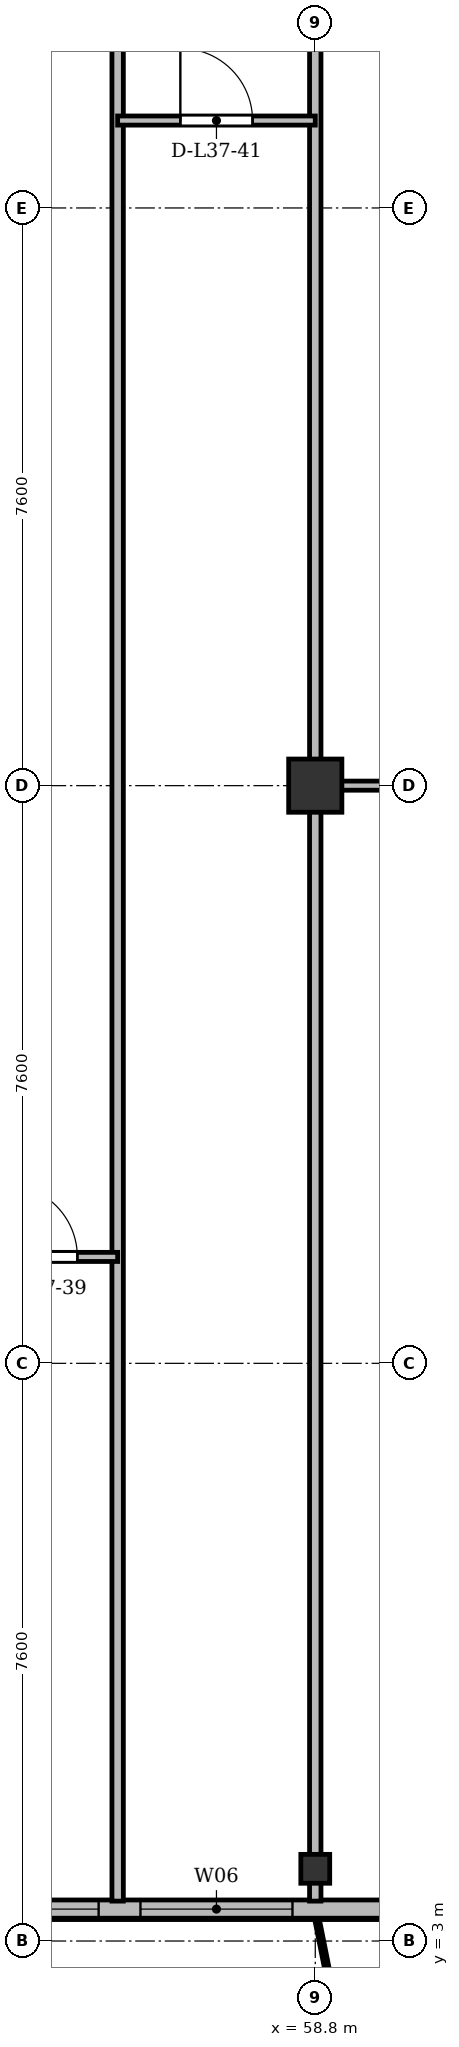
"""IFC4 building model, lengths in metres.
Left out: names, types, materials, properties, quantities, classifications, styles, units other than length and angle.
Written with IfcOpenShell. Run it as: python <this file> out.ifc"""

import sys

from ifc_helpers import new_model, si_unit, direction, frame, frame_2d, origin, origin_2d, place, context, subcontext, project, spatial, rectangle, i_section, extrude, source, transform, mapped, element, fill, save


model = new_model("IFC4")
c1 = context("Model", 3, precision=1e-05, world=origin(), true_north=direction((0.0, 1.0)))
c2 = subcontext(c1, "Body", "Model", "MODEL_VIEW")
j1 = project(units=[si_unit("LENGTHUNIT", "METRE"), si_unit("PLANEANGLEUNIT", "RADIAN")], contexts=[c1])
p1 = place(None, origin())
s1 = spatial("IfcSite", under=j1, at=p1, CompositionType="ELEMENT")
p2 = place(p1, origin())
s2 = spatial("IfcBuilding", under=s1, at=p2, CompositionType="ELEMENT")
p3 = place(p2, frame((0.0, 0.0, 142.9)))
s3 = spatial("IfcBuildingStorey", under=s2, at=p3, CompositionType="ELEMENT", Elevation=142.9)
m1 = source(origin(), c2, "Body", "SweptSolid", [
    extrude(i_section(OverallWidth=0.38, OverallDepth=0.38, WebThickness=0.02, FlangeThickness=0.03, at=origin_2d()), origin(), (0.0, 0.0, 1.0), 3.6),
])
p4 = place(p3, frame((58.8, 3.95, 0.0), z_axis=(0.0, 0.0, 1.0), x_axis=(1.0, 0.0, 0.0)))
e1 = element("IfcColumn", 1, at=p4, inside=s3, PredefinedType="COLUMN", context=c2, shape_type="MappedRepresentation", body=[
    mapped(m1, transform((0.0, 0.0, 0.0), x_axis=(1.0, 0.0, 0.0), y_axis=(0.0, 1.0, 0.0), z_axis=(0.0, 0.0, 1.0), scale=1.0)),
])
m2 = source(origin(), c2, "Body", "SweptSolid", [
    extrude(rectangle(XDim=0.7, YDim=0.7, at=origin_2d()), origin(), (0.0, 0.0, 1.0), 3.6),
])
p5 = place(p3, frame((58.8, 18.2, 0.0), z_axis=(0.0, 0.0, 1.0), x_axis=(1.0, 0.0, 0.0)))
e2 = element("IfcColumn", 2, at=p5, inside=s3, PredefinedType="COLUMN", context=c2, shape_type="MappedRepresentation", body=[
    mapped(m2, transform((0.0, 0.0, 0.0), x_axis=(1.0, 0.0, 0.0), y_axis=(0.0, 1.0, 0.0), z_axis=(0.0, 0.0, 1.0), scale=1.0)),
])
p6 = place(p3, frame((63.6, 3.42, 0.0), z_axis=(0.0, 0.0, 1.0), x_axis=(-1.0, 0.0, 0.0)))
e3 = element("IfcWall", 3, at=p6, inside=s3, PredefinedType="SOLIDWALL", context=c2, shape_type="SweptSolid", body=[
    extrude(rectangle(XDim=52.8, YDim=0.24, at=frame_2d((26.4, 0.0))), origin(), (0.0, 0.0, 1.0), 3.35),
])
p7 = place(p6, frame((1.695, 0.0, 0.9)))
e4 = element("IfcOpeningElement", 4, at=p7, cuts=e3, PredefinedType="OPENING", context=c2, shape_type="SweptSolid", body=[
    extrude(rectangle(XDim=1.5, YDim=1.75, at=frame_2d((0.75, 0.875))), frame((0.0, 0.13, 0.0), z_axis=(0.0, -1.0, 0.0), x_axis=(1.0, 0.0, 0.0)), (0.0, 0.0, 1.0), 0.26),
])
p8 = place(p6, frame((5.1, 0.0, 0.9)))
e5 = element("IfcOpeningElement", 5, at=p8, cuts=e3, PredefinedType="OPENING", context=c2, shape_type="SweptSolid", body=[
    extrude(rectangle(XDim=2.0, YDim=1.95, at=frame_2d((1.0, 0.975))), frame((0.0, 0.13, 0.0), z_axis=(0.0, -1.0, 0.0), x_axis=(1.0, 0.0, 0.0)), (0.0, 0.0, 1.0), 0.26),
])
p9 = place(p6, frame((7.65, 0.0, 0.9)))
e6 = element("IfcOpeningElement", 6, at=p9, cuts=e3, PredefinedType="OPENING", context=c2, shape_type="SweptSolid", body=[
    extrude(rectangle(XDim=1.5, YDim=1.75, at=frame_2d((0.75, 0.875))), frame((0.0, 0.13, 0.0), z_axis=(0.0, -1.0, 0.0), x_axis=(1.0, 0.0, 0.0)), (0.0, 0.0, 1.0), 0.26),
])
p10 = place(p6, frame((10.1, 0.0, 0.9)))
e7 = element("IfcOpeningElement", 7, at=p10, cuts=e3, PredefinedType="OPENING", context=c2, shape_type="SweptSolid", body=[
    extrude(rectangle(XDim=1.8, YDim=1.8, at=frame_2d((0.9, 0.9))), frame((0.0, 0.13, 0.0), z_axis=(0.0, -1.0, 0.0), x_axis=(1.0, 0.0, 0.0)), (0.0, 0.0, 1.0), 0.26),
])
p11 = place(p6, frame((14.417, 0.0, 0.0)))
e8 = element("IfcOpeningElement", 8, at=p11, cuts=e3, PredefinedType="OPENING", context=c2, shape_type="SweptSolid", body=[
    extrude(rectangle(XDim=1.2, YDim=2.2, at=frame_2d((0.6, 1.1))), frame((0.0, 0.13, 0.0), z_axis=(0.0, -1.0, 0.0), x_axis=(1.0, 0.0, 0.0)), (0.0, 0.0, 1.0), 0.26),
])
p12 = place(p6, frame((25.65, 0.0, 0.9)))
e9 = element("IfcOpeningElement", 9, at=p12, cuts=e3, PredefinedType="OPENING", context=c2, shape_type="SweptSolid", body=[
    extrude(rectangle(XDim=1.5, YDim=1.75, at=frame_2d((0.75, 0.875))), frame((0.0, 0.13, 0.0), z_axis=(0.0, -1.0, 0.0), x_axis=(1.0, 0.0, 0.0)), (0.0, 0.0, 1.0), 0.26),
])
p13 = place(p6, frame((35.6, 0.0, 0.9)))
e10 = element("IfcOpeningElement", 10, at=p13, cuts=e3, PredefinedType="OPENING", context=c2, shape_type="SweptSolid", body=[
    extrude(rectangle(XDim=2.0, YDim=1.95, at=frame_2d((1.0, 0.975))), frame((0.0, 0.13, 0.0), z_axis=(0.0, -1.0, 0.0), x_axis=(1.0, 0.0, 0.0)), (0.0, 0.0, 1.0), 0.26),
])
p14 = place(p6, frame((41.656, 0.0, 0.0)))
e11 = element("IfcOpeningElement", 11, at=p14, cuts=e3, PredefinedType="OPENING", context=c2, shape_type="SweptSolid", body=[
    extrude(rectangle(XDim=1.2, YDim=2.2, at=frame_2d((0.6, 1.1))), frame((0.0, 0.13, 0.0), z_axis=(0.0, -1.0, 0.0), x_axis=(1.0, 0.0, 0.0)), (0.0, 0.0, 1.0), 0.26),
])
p15 = place(p6, frame((43.65, 0.0, 0.9)))
e12 = element("IfcOpeningElement", 12, at=p15, cuts=e3, PredefinedType="OPENING", context=c2, shape_type="SweptSolid", body=[
    extrude(rectangle(XDim=1.5, YDim=1.75, at=frame_2d((0.75, 0.875))), frame((0.0, 0.13, 0.0), z_axis=(0.0, -1.0, 0.0), x_axis=(1.0, 0.0, 0.0)), (0.0, 0.0, 1.0), 0.26),
])
p16 = place(p6, frame((45.95, 0.0, 0.9)))
e13 = element("IfcOpeningElement", 13, at=p16, cuts=e3, PredefinedType="OPENING", context=c2, shape_type="SweptSolid", body=[
    extrude(rectangle(XDim=1.5, YDim=1.75, at=frame_2d((0.75, 0.875))), frame((0.0, 0.13, 0.0), z_axis=(0.0, -1.0, 0.0), x_axis=(1.0, 0.0, 0.0)), (0.0, 0.0, 1.0), 0.26),
])
p17 = place(p6, frame((49.605, 0.0, 0.9)))
e14 = element("IfcOpeningElement", 14, at=p17, cuts=e3, PredefinedType="OPENING", context=c2, shape_type="SweptSolid", body=[
    extrude(rectangle(XDim=1.5, YDim=1.75, at=frame_2d((0.75, 0.875))), frame((0.0, 0.13, 0.0), z_axis=(0.0, -1.0, 0.0), x_axis=(1.0, 0.0, 0.0)), (0.0, 0.0, 1.0), 0.26),
])
p18 = place(p3, frame((58.8, 3.525, 0.0), z_axis=(0.0, 0.0, 1.0), x_axis=(0.0, 1.0, 0.0)))
e15 = element("IfcWall", 15, at=p18, inside=s3, PredefinedType="PARTITIONING", context=c2, shape_type="SweptSolid", body=[
    extrude(rectangle(XDim=27.275, YDim=0.15, at=frame_2d((13.638, 0.0))), origin(), (0.0, 0.0, 1.0), 2.85),
])
p19 = place(p3, frame((56.2, 3.525, 0.0), z_axis=(0.0, 0.0, 1.0), x_axis=(0.0, 1.0, 0.0)))
e16 = element("IfcWall", 16, at=p19, inside=s3, PredefinedType="PARTITIONING", context=c2, shape_type="SweptSolid", body=[
    extrude(rectangle(XDim=27.275, YDim=0.15, at=frame_2d((13.638, 0.0))), origin(), (0.0, 0.0, 1.0), 2.75),
])
p20 = place(p3, frame((54.2, 12.0, 0.0), z_axis=(0.0, 0.0, 1.0), x_axis=(1.0, 0.0, 0.0)))
e17 = element("IfcWall", 17, at=p20, inside=s3, PredefinedType="PARTITIONING", context=c2, shape_type="SweptSolid", body=[
    extrude(rectangle(XDim=2.0, YDim=0.12, at=frame_2d((1.0, 0.0))), origin(), (0.0, 0.0, 1.0), 3.35),
])
p21 = place(p20, frame((0.52, 0.0, 0.0)))
e18 = element("IfcOpeningElement", 18, at=p21, cuts=e17, PredefinedType="OPENING", context=c2, shape_type="SweptSolid", body=[
    extrude(rectangle(XDim=0.95, YDim=2.15, at=frame_2d((0.475, 1.075))), frame((0.0, 0.07, 0.0), z_axis=(0.0, -1.0, 0.0), x_axis=(1.0, 0.0, 0.0)), (0.0, 0.0, 1.0), 0.14),
])
p22 = place(p3, frame((56.2, 26.95, 0.0), z_axis=(0.0, 0.0, 1.0), x_axis=(1.0, 0.0, 0.0)))
e19 = element("IfcWall", 19, at=p22, inside=s3, PredefinedType="PARTITIONING", context=c2, shape_type="SweptSolid", body=[
    extrude(rectangle(XDim=2.6, YDim=0.12, at=frame_2d((1.3, 0.0))), origin(), (0.0, 0.0, 1.0), 2.85),
])
p23 = place(p22, frame((0.825, 0.0, 0.0)))
e20 = element("IfcOpeningElement", 20, at=p23, cuts=e19, PredefinedType="OPENING", context=c2, shape_type="SweptSolid", body=[
    extrude(rectangle(XDim=0.95, YDim=2.15, at=frame_2d((0.475, 1.075))), frame((0.0, 0.07, 0.0), z_axis=(0.0, -1.0, 0.0), x_axis=(1.0, 0.0, 0.0)), (0.0, 0.0, 1.0), 0.14),
])
p24 = place(p3, frame((58.8, 18.2, 0.0), z_axis=(0.0, 0.0, 1.0), x_axis=(1.0, 0.0, 0.0)))
e21 = element("IfcWall", 21, at=p24, inside=s3, PredefinedType="PARTITIONING", context=c2, shape_type="SweptSolid", body=[
    extrude(rectangle(XDim=7.575, YDim=0.12, at=frame_2d((3.788, 0.0))), origin(), (0.0, 0.0, 1.0), 2.75),
])
p25 = place(p24, frame((3.313, 0.0, 0.0)))
e22 = element("IfcOpeningElement", 22, at=p25, cuts=e21, PredefinedType="OPENING", context=c2, shape_type="SweptSolid", body=[
    extrude(rectangle(XDim=0.95, YDim=2.15, at=frame_2d((0.475, 1.075))), frame((0.0, 0.07, 0.0), z_axis=(0.0, -1.0, 0.0), x_axis=(1.0, 0.0, 0.0)), (0.0, 0.0, 1.0), 0.14),
])
m3 = source(origin(), c2, "Body", "SweptSolid", [
    extrude(rectangle(XDim=2.0, YDim=1.95, at=frame_2d((1.0, 0.975))), frame((0.0, 0.03, 0.0), z_axis=(0.0, -1.0, 0.0), x_axis=(1.0, 0.0, 0.0)), (0.0, 0.0, 1.0), 0.06),
])
p26 = place(p8, origin())
e23 = element("IfcWindow", 23, at=p26, inside=s3, PartitioningType="SINGLE_PANEL", PredefinedType="WINDOW", context=c2, shape_type="MappedRepresentation", body=[
    mapped(m3, transform((0.0, 0.0, 0.0), x_axis=(1.0, 0.0, 0.0), y_axis=(0.0, 1.0, 0.0), z_axis=(0.0, 0.0, 1.0), scale=1.0)),
])
fill(e5, e23)
m4 = source(origin(), c2, "Body", "SweptSolid", [
    extrude(rectangle(XDim=1.5, YDim=1.75, at=frame_2d((0.75, 0.875))), frame((0.0, 0.03, 0.0), z_axis=(0.0, -1.0, 0.0), x_axis=(1.0, 0.0, 0.0)), (0.0, 0.0, 1.0), 0.06),
])
p27 = place(p9, origin())
e24 = element("IfcWindow", 24, at=p27, inside=s3, PartitioningType="SINGLE_PANEL", PredefinedType="WINDOW", context=c2, shape_type="MappedRepresentation", body=[
    mapped(m4, transform((0.0, 0.0, 0.0), x_axis=(1.0, 0.0, 0.0), y_axis=(0.0, 1.0, 0.0), z_axis=(0.0, 0.0, 1.0), scale=1.0)),
])
fill(e6, e24)
m5 = source(origin(), c2, "Body", "SweptSolid", [
    extrude(rectangle(XDim=0.95, YDim=2.15, at=frame_2d((0.475, 1.075))), frame((0.0, 0.025, 0.0), z_axis=(0.0, -1.0, 0.0), x_axis=(1.0, 0.0, 0.0)), (0.0, 0.0, 1.0), 0.05),
])
p28 = place(p21, origin())
e25 = element("IfcDoor", 25, at=p28, inside=s3, OperationType="SINGLE_SWING_LEFT", PredefinedType="DOOR", context=c2, shape_type="MappedRepresentation", body=[
    mapped(m5, transform((0.0, 0.0, 0.0), x_axis=(1.0, 0.0, 0.0), y_axis=(0.0, 1.0, 0.0), z_axis=(0.0, 0.0, 1.0), scale=1.0)),
])
fill(e18, e25)
p29 = place(p23, origin())
e26 = element("IfcDoor", 26, at=p29, inside=s3, OperationType="SINGLE_SWING_LEFT", PredefinedType="DOOR", context=c2, shape_type="MappedRepresentation", body=[
    mapped(m5, transform((0.0, 0.0, 0.0), x_axis=(1.0, 0.0, 0.0), y_axis=(0.0, 1.0, 0.0), z_axis=(0.0, 0.0, 1.0), scale=1.0)),
])
fill(e20, e26)
save(model, sys.argv[1])
